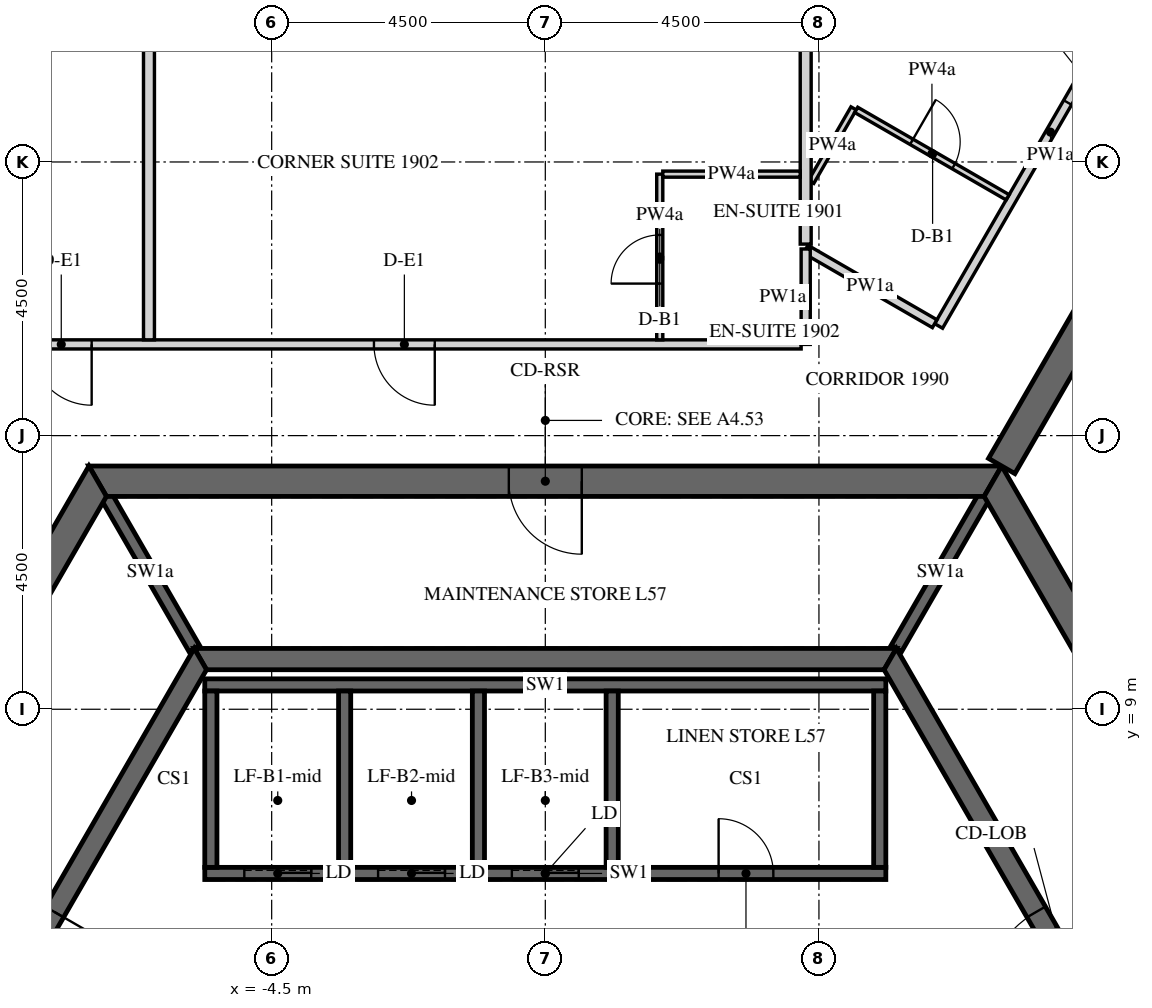
"""IFC4 building model, lengths in metres.
Left out: names, types, materials, properties, quantities, classifications, styles, units other than length and angle.
Written with IfcOpenShell. Run it as: python <this file> out.ifc"""

import sys

from ifc_helpers import new_model, si_unit, direction, frame, frame_2d, origin, place, context, subcontext, project, spatial, polyline, rectangle, outline, extrude, element, fill, save


model = new_model("IFC4")
c1 = context("Model", 3, precision=1e-05, world=origin(), true_north=direction((0.0, 1.0)))
c2 = subcontext(c1, "Body", "Model", "MODEL_VIEW")
j1 = project(units=[si_unit("LENGTHUNIT", "METRE"), si_unit("PLANEANGLEUNIT", "RADIAN")], contexts=[c1])
p1 = place(None, origin())
s1 = spatial("IfcSite", under=j1, at=p1, CompositionType="ELEMENT")
p2 = place(p1, origin())
s2 = spatial("IfcBuilding", under=s1, at=p2, CompositionType="ELEMENT")
p3 = place(p2, frame((0.0, 0.0, 238.5)))
s3 = spatial("IfcBuildingStorey", under=s2, at=p3, CompositionType="ELEMENT", Elevation=238.5)
p4 = place(p3, frame((-7.361, 12.75, -0.15), z_axis=(0.0, 0.0, 1.0), x_axis=(-0.50000571537, -0.866022103989, 0.0)))
e1 = element("IfcWall", 1, at=p4, inside=s3, PredefinedType="SHEAR", context=c2, shape_type="SweptSolid", body=[
    extrude(outline(polyline([(-0.144, -0.25), (14.867, -0.25), (14.578, 0.25), (0.144, 0.25), (-0.144, -0.25)])), origin(), (0.0, 0.0, 1.0), 3.9),
])
p5 = place(p4, frame((6.49, 0.0, 0.15)))
e2 = element("IfcOpeningElement", 2, at=p5, cuts=e1, PredefinedType="OPENING", context=c2, shape_type="SweptSolid", body=[
    extrude(rectangle(XDim=1.8, YDim=2.4, at=frame_2d((0.9, 1.2))), frame((0.0, 0.26, 0.0), z_axis=(0.0, -1.0, 0.0), x_axis=(1.0, 0.0, 0.0)), (0.0, 0.0, 1.0), 0.52),
])
p6 = place(p3, frame((14.722, 0.0, -0.15), z_axis=(0.0, 0.0, 1.0), x_axis=(-0.50000571537, 0.866022103989, 0.0)))
e3 = element("IfcWall", 3, at=p6, inside=s3, PredefinedType="SHEAR", context=c2, shape_type="SweptSolid", body=[
    extrude(outline(polyline([(-0.144, -0.25), (14.867, -0.25), (14.578, 0.25), (0.144, 0.25), (-0.144, -0.25)])), origin(), (0.0, 0.0, 1.0), 3.9),
])
p7 = place(p6, frame((6.432, 0.0, 0.15)))
e4 = element("IfcOpeningElement", 4, at=p7, cuts=e3, PredefinedType="OPENING", context=c2, shape_type="SweptSolid", body=[
    extrude(rectangle(XDim=1.8, YDim=2.4, at=frame_2d((0.9, 1.2))), frame((0.0, 0.26, 0.0), z_axis=(0.0, -1.0, 0.0), x_axis=(1.0, 0.0, 0.0)), (0.0, 0.0, 1.0), 0.52),
])
p8 = place(p3, frame((7.361, 12.75, -0.15), z_axis=(0.0, 0.0, 1.0), x_axis=(-1.0, 0.0, 0.0)))
e5 = element("IfcWall", 5, at=p8, inside=s3, PredefinedType="SHEAR", context=c2, shape_type="SweptSolid", body=[
    extrude(outline(polyline([(-0.144, -0.25), (14.866, -0.25), (14.578, 0.25), (0.144, 0.25), (-0.144, -0.25)])), origin(), (0.0, 0.0, 1.0), 3.9),
])
p9 = place(p8, frame((6.761, 0.0, 0.15)))
e6 = element("IfcOpeningElement", 6, at=p9, cuts=e5, PredefinedType="OPENING", context=c2, shape_type="SweptSolid", body=[
    extrude(rectangle(XDim=1.2, YDim=2.4, at=frame_2d((0.6, 1.2))), frame((0.0, 0.26, 0.0), z_axis=(0.0, -1.0, 0.0), x_axis=(1.0, 0.0, 0.0)), (0.0, 0.0, 1.0), 0.52),
])
p10 = place(p3, frame((7.506, 13.0, -0.15), z_axis=(0.0, 0.0, 1.0), x_axis=(0.499988271576, 0.866032175087, 0.0)))
e7 = element("IfcWall", 7, at=p10, inside=s3, PredefinedType="SHEAR", context=c2, shape_type="SweptSolid", body=[
    extrude(rectangle(XDim=15.424, YDim=0.5, at=frame_2d((7.712, 0.0))), origin(), (0.0, 0.0, 1.0), 3.9),
])
p11 = place(p10, frame((6.812, 0.0, 0.15)))
e8 = element("IfcOpeningElement", 8, at=p11, cuts=e7, PredefinedType="OPENING", context=c2, shape_type="SweptSolid", body=[
    extrude(rectangle(XDim=1.8, YDim=2.4, at=frame_2d((0.9, 1.2))), frame((0.0, 0.26, 0.0), z_axis=(0.0, -1.0, 0.0), x_axis=(1.0, 0.0, 0.0)), (0.0, 0.0, 1.0), 0.52),
])
p12 = place(p3, frame((-5.673, 9.825, -0.15), z_axis=(0.0, 0.0, 1.0), x_axis=(-0.499995046907, -0.866028263435, 0.0)))
e9 = element("IfcWall", 9, at=p12, inside=s3, PredefinedType="SHEAR", context=c2, shape_type="SweptSolid", body=[
    extrude(outline(polyline([(-0.101, -0.175), (11.446, -0.175), (11.244, 0.175), (0.101, 0.175), (-0.101, -0.175)])), origin(), (0.0, 0.0, 1.0), 3.9),
])
p13 = place(p12, frame((4.801, 0.0, 0.15)))
e10 = element("IfcOpeningElement", 10, at=p13, cuts=e9, PredefinedType="OPENING", context=c2, shape_type="SweptSolid", body=[
    extrude(rectangle(XDim=1.8, YDim=2.4, at=frame_2d((0.9, 1.2))), frame((0.0, 0.185, 0.0), z_axis=(0.0, -1.0, 0.0), x_axis=(1.0, 0.0, 0.0)), (0.0, 0.0, 1.0), 0.37),
])
p14 = place(p3, frame((11.345, 0.0, -0.15), z_axis=(0.0, 0.0, 1.0), x_axis=(-0.499995046907, 0.866028263435, 0.0)))
e11 = element("IfcWall", 11, at=p14, inside=s3, PredefinedType="SHEAR", context=c2, shape_type="SweptSolid", body=[
    extrude(outline(polyline([(-0.101, -0.175), (11.446, -0.175), (11.244, 0.175), (0.101, 0.175), (-0.101, -0.175)])), origin(), (0.0, 0.0, 1.0), 3.9),
])
p15 = place(p14, frame((4.744, 0.0, 0.15)))
e12 = element("IfcOpeningElement", 12, at=p15, cuts=e11, PredefinedType="OPENING", context=c2, shape_type="SweptSolid", body=[
    extrude(rectangle(XDim=1.8, YDim=2.4, at=frame_2d((0.9, 1.2))), frame((0.0, 0.185, 0.0), z_axis=(0.0, -1.0, 0.0), x_axis=(1.0, 0.0, 0.0)), (0.0, 0.0, 1.0), 0.37),
])
p16 = place(p3, frame((5.673, 9.825, -0.15), z_axis=(0.0, 0.0, 1.0), x_axis=(-1.0, 0.0, 0.0)))
e13 = element("IfcWall", 13, at=p16, inside=s3, PredefinedType="SHEAR", context=c2, shape_type="SweptSolid", body=[
    extrude(outline(polyline([(-0.101, -0.175), (11.446, -0.175), (11.244, 0.175), (0.101, 0.175), (-0.101, -0.175)])), origin(), (0.0, 0.0, 1.0), 3.9),
])
p17 = place(p3, frame((-5.6, 6.3, -0.25), z_axis=(0.0, 0.0, 1.0), x_axis=(1.0, 0.0, 0.0)))
e14 = element("IfcWall", 14, at=p17, inside=s3, PredefinedType="SHEAR", context=c2, shape_type="SweptSolid", body=[
    extrude(rectangle(XDim=11.2, YDim=0.2, at=frame_2d((5.6, 0.0))), origin(), (0.0, 0.0, 1.0), 3.9),
])
p18 = place(p17, frame((8.45, 0.0, 0.25)))
e15 = element("IfcOpeningElement", 15, at=p18, cuts=e14, PredefinedType="OPENING", context=c2, shape_type="SweptSolid", body=[
    extrude(rectangle(XDim=0.9, YDim=2.1, at=frame_2d((0.45, 1.05))), frame((0.0, 0.11, 0.0), z_axis=(0.0, -1.0, 0.0), x_axis=(1.0, 0.0, 0.0)), (0.0, 0.0, 1.0), 0.22),
])
p19 = place(p17, frame((0.65, 0.0, 0.25)))
e16 = element("IfcOpeningElement", 16, at=p19, cuts=e14, PredefinedType="OPENING", context=c2, shape_type="SweptSolid", body=[
    extrude(rectangle(XDim=1.1, YDim=2.1, at=frame_2d((0.55, 1.05))), frame((0.0, 0.11, 0.0), z_axis=(0.0, -1.0, 0.0), x_axis=(1.0, 0.0, 0.0)), (0.0, 0.0, 1.0), 0.22),
])
p20 = place(p17, frame((2.85, 0.0, 0.25)))
e17 = element("IfcOpeningElement", 17, at=p20, cuts=e14, PredefinedType="OPENING", context=c2, shape_type="SweptSolid", body=[
    extrude(rectangle(XDim=1.1, YDim=2.1, at=frame_2d((0.55, 1.05))), frame((0.0, 0.11, 0.0), z_axis=(0.0, -1.0, 0.0), x_axis=(1.0, 0.0, 0.0)), (0.0, 0.0, 1.0), 0.22),
])
p21 = place(p17, frame((5.05, 0.0, 0.25)))
e18 = element("IfcOpeningElement", 18, at=p21, cuts=e14, PredefinedType="OPENING", context=c2, shape_type="SweptSolid", body=[
    extrude(rectangle(XDim=1.1, YDim=2.1, at=frame_2d((0.55, 1.05))), frame((0.0, 0.11, 0.0), z_axis=(0.0, -1.0, 0.0), x_axis=(1.0, 0.0, 0.0)), (0.0, 0.0, 1.0), 0.22),
])
p22 = place(p3, frame((-5.6, 9.4, -0.25), z_axis=(0.0, 0.0, 1.0), x_axis=(1.0, 0.0, 0.0)))
e19 = element("IfcWall", 19, at=p22, inside=s3, PredefinedType="SHEAR", context=c2, shape_type="SweptSolid", body=[
    extrude(rectangle(XDim=11.2, YDim=0.2, at=frame_2d((5.6, 0.0))), origin(), (0.0, 0.0, 1.0), 3.9),
])
for number, where, z_axis, x_axis in (
    (20, (-5.5, 6.4, -0.25), (0.0, 0.0, 1.0), (0.0, 1.0, 0.0)),
    (21, (-3.3, 6.4, -0.25), (0.0, 0.0, 1.0), (0.0, 1.0, 0.0)),
    (22, (-1.1, 6.4, -0.25), (0.0, 0.0, 1.0), (0.0, 1.0, 0.0)),
    (23, (1.1, 6.4, -0.25), (0.0, 0.0, 1.0), (0.0, 1.0, 0.0)),
    (24, (5.5, 6.4, -0.25), (0.0, 0.0, 1.0), (0.0, 1.0, 0.0)),
):
    element("IfcWall", number, at=place(p3, frame(where, z_axis=z_axis, x_axis=x_axis)), inside=s3, PredefinedType="SHEAR", context=c2, shape_type="SweptSolid", body=[
        extrude(rectangle(XDim=2.9, YDim=0.2, at=frame_2d((1.45, 0.0))), origin(), (0.0, 0.0, 1.0), 3.9),
    ])
for number, where, z_axis, x_axis in (
    (25, (5.773, 10.0, -0.15), (0.0, 0.0, 1.0), (0.5, 0.866, 0.0)),
    (26, (-5.773, 10.0, -0.15), (0.0, 0.0, 1.0), (-0.5, 0.866, 0.0)),
):
    element("IfcWall", number, at=place(p3, frame(where, z_axis=z_axis, x_axis=x_axis)), inside=s3, PredefinedType="SHEAR", context=c2, shape_type="SweptSolid", body=[
        extrude(rectangle(XDim=2.887, YDim=0.2, at=frame_2d((1.443, 0.0))), origin(), (0.0, 0.0, 1.0), 3.9),
    ])
p23 = place(p3, frame((10.149, 21.678, 0.0), z_axis=(0.0, 0.0, 1.0), x_axis=(-0.500020076982, -0.866013812023, 0.0)))
e27 = element("IfcWall", 27, at=p23, inside=s3, PredefinedType="PARTITIONING", context=c2, shape_type="SweptSolid", body=[
    extrude(rectangle(XDim=7.361, YDim=0.15, at=frame_2d((3.681, 0.0))), origin(), (0.0, 0.0, 1.0), 2.838),
])
p24 = place(p23, frame((2.118, 0.0, 0.0)))
e28 = element("IfcOpeningElement", 28, at=p24, cuts=e27, PredefinedType="OPENING", context=c2, shape_type="SweptSolid", body=[
    extrude(rectangle(XDim=1.0, YDim=2.1, at=frame_2d((0.5, 1.05))), frame((0.0, 0.085, 0.0), z_axis=(0.0, -1.0, 0.0), x_axis=(1.0, 0.0, 0.0)), (0.0, 0.0, 1.0), 0.17),
])
p25 = place(p3, frame((6.403, 15.341, 0.0), z_axis=(0.0, 0.0, 1.0), x_axis=(-0.8660013066, 0.500041735226, 0.0)))
e29 = element("IfcWall", 29, at=p25, inside=s3, PredefinedType="PARTITIONING", context=c2, shape_type="SweptSolid", body=[
    extrude(rectangle(XDim=2.449, YDim=0.15, at=frame_2d((1.225, 0.0))), origin(), (0.0, 0.0, 1.0), 2.838),
])
p26 = place(p3, frame((4.207, 15.0, 0.0), z_axis=(0.0, 0.0, 1.0), x_axis=(-1.0, 0.0, 0.0)))
e30 = element("IfcWall", 30, at=p26, inside=s3, PredefinedType="PARTITIONING", context=c2, shape_type="SweptSolid", body=[
    extrude(rectangle(XDim=12.867, YDim=0.15, at=frame_2d((6.434, 0.0))), origin(), (0.0, 0.0, 1.0), 2.838),
])
p27 = place(p26, frame((6.025, 0.0, 0.0)))
e31 = element("IfcOpeningElement", 31, at=p27, cuts=e30, PredefinedType="OPENING", context=c2, shape_type="SweptSolid", body=[
    extrude(rectangle(XDim=1.0, YDim=2.1, at=frame_2d((0.5, 1.05))), frame((0.0, 0.085, 0.0), z_axis=(0.0, -1.0, 0.0), x_axis=(1.0, 0.0, 0.0)), (0.0, 0.0, 1.0), 0.17),
])
p28 = place(p26, frame((11.667, 0.0, 0.0)))
e32 = element("IfcOpeningElement", 32, at=p28, cuts=e30, PredefinedType="OPENING", context=c2, shape_type="SweptSolid", body=[
    extrude(rectangle(XDim=1.0, YDim=2.1, at=frame_2d((0.5, 1.05))), frame((0.0, 0.085, 0.0), z_axis=(0.0, -1.0, 0.0), x_axis=(1.0, 0.0, 0.0)), (0.0, 0.0, 1.0), 0.17),
])
p29 = place(p3, frame((4.282, 16.569, 0.0), z_axis=(0.0, 0.0, 1.0), x_axis=(0.0, -1.0, 0.0)))
e33 = element("IfcWall", 33, at=p29, inside=s3, PredefinedType="PARTITIONING", context=c2, shape_type="SweptSolid", body=[
    extrude(rectangle(XDim=1.569, YDim=0.15, at=frame_2d((0.785, 0.0))), origin(), (0.0, 0.0, 1.0), 2.838),
])
p30 = place(p3, frame((4.372, 17.673, 0.0), z_axis=(0.0, 0.0, 1.0), x_axis=(0.50007068215, 0.86598459158, 0.0)))
e34 = element("IfcWall", 34, at=p30, inside=s3, PredefinedType="PARTITIONING", context=c2, shape_type="SweptSolid", body=[
    extrude(rectangle(XDim=1.396, YDim=0.1, at=frame_2d((0.698, 0.0))), origin(), (0.0, 0.0, 1.0), 2.838),
])
p31 = place(p3, frame((5.113, 18.857, 0.0), z_axis=(0.0, 0.0, 1.0), x_axis=(0.866039941686, -0.499974818771, 0.0)))
e35 = element("IfcWall", 35, at=p31, inside=s3, PredefinedType="PARTITIONING", context=c2, shape_type="SweptSolid", body=[
    extrude(rectangle(XDim=2.875, YDim=0.1, at=frame_2d((1.438, 0.0))), origin(), (0.0, 0.0, 1.0), 2.838),
])
p32 = place(p31, frame((1.05, 0.0, 0.0)))
e36 = element("IfcOpeningElement", 36, at=p32, cuts=e35, PredefinedType="OPENING", context=c2, shape_type="SweptSolid", body=[
    extrude(rectangle(XDim=0.8, YDim=2.1, at=frame_2d((0.4, 1.05))), frame((0.0, 0.06, 0.0), z_axis=(0.0, -1.0, 0.0), x_axis=(1.0, 0.0, 0.0)), (0.0, 0.0, 1.0), 0.12),
])
p33 = place(p3, frame((4.282, 27.45, 0.0), z_axis=(0.0, 0.0, 1.0), x_axis=(0.0, -1.0, 0.0)))
e37 = element("IfcWall", 37, at=p33, inside=s3, PredefinedType="PARTITIONING", context=c2, shape_type="SweptSolid", body=[
    extrude(rectangle(XDim=10.801, YDim=0.18, at=frame_2d((5.4, 0.0))), origin(), (0.0, 0.0, 1.0), 2.838),
])
p34 = place(p3, frame((1.882, 15.075, 0.0), z_axis=(0.0, 0.0, 1.0), x_axis=(0.0, 1.0, 0.0)))
e38 = element("IfcWall", 38, at=p34, inside=s3, PredefinedType="PARTITIONING", context=c2, shape_type="SweptSolid", body=[
    extrude(rectangle(XDim=2.725, YDim=0.1, at=frame_2d((1.363, 0.0))), origin(), (0.0, 0.0, 1.0), 2.838),
])
p35 = place(p34, frame((0.925, 0.0, 0.0)))
e39 = element("IfcOpeningElement", 39, at=p35, cuts=e38, PredefinedType="OPENING", context=c2, shape_type="SweptSolid", body=[
    extrude(rectangle(XDim=0.8, YDim=2.1, at=frame_2d((0.4, 1.05))), frame((0.0, 0.06, 0.0), z_axis=(0.0, -1.0, 0.0), x_axis=(1.0, 0.0, 0.0)), (0.0, 0.0, 1.0), 0.12),
])
p36 = place(p3, frame((1.932, 17.8, 0.0), z_axis=(0.0, 0.0, 1.0), x_axis=(1.0, 0.0, 0.0)))
e40 = element("IfcWall", 40, at=p36, inside=s3, PredefinedType="PARTITIONING", context=c2, shape_type="SweptSolid", body=[
    extrude(rectangle(XDim=2.26, YDim=0.1, at=frame_2d((1.13, 0.0))), origin(), (0.0, 0.0, 1.0), 2.838),
])
p37 = place(p3, frame((-6.518, 27.45, 0.0), z_axis=(0.0, 0.0, 1.0), x_axis=(0.0, -1.0, 0.0)))
e41 = element("IfcWall", 41, at=p37, inside=s3, PredefinedType="PARTITIONING", context=c2, shape_type="SweptSolid", body=[
    extrude(rectangle(XDim=12.375, YDim=0.18, at=frame_2d((6.188, 0.0))), origin(), (0.0, 0.0, 1.0), 2.838),
])
p38 = place(p9, origin())
e42 = element("IfcDoor", 42, at=p38, inside=s3, OperationType="SINGLE_SWING_LEFT", PredefinedType="DOOR", context=c2, shape_type="SweptSolid", body=[
    extrude(rectangle(XDim=1.2, YDim=2.4, at=frame_2d((0.6, 1.2))), frame((0.0, 0.025, 0.0), z_axis=(0.0, -1.0, 0.0), x_axis=(1.0, 0.0, 0.0)), (0.0, 0.0, 1.0), 0.05),
])
fill(e6, e42)
p39 = place(p13, origin())
e43 = element("IfcDoor", 43, at=p39, inside=s3, OperationType="DOUBLE_DOOR_SINGLE_SWING", PredefinedType="DOOR", context=c2, shape_type="SweptSolid", body=[
    extrude(rectangle(XDim=1.8, YDim=2.4, at=frame_2d((0.9, 1.2))), frame((0.0, 0.025, 0.0), z_axis=(0.0, -1.0, 0.0), x_axis=(1.0, 0.0, 0.0)), (0.0, 0.0, 1.0), 0.05),
])
fill(e10, e43)
p40 = place(p15, origin())
e44 = element("IfcDoor", 44, at=p40, inside=s3, OperationType="DOUBLE_DOOR_SINGLE_SWING", PredefinedType="DOOR", context=c2, shape_type="SweptSolid", body=[
    extrude(rectangle(XDim=1.8, YDim=2.4, at=frame_2d((0.9, 1.2))), frame((0.0, 0.025, 0.0), z_axis=(0.0, -1.0, 0.0), x_axis=(1.0, 0.0, 0.0)), (0.0, 0.0, 1.0), 0.05),
])
fill(e12, e44)
p41 = place(p18, origin())
e45 = element("IfcDoor", 45, at=p41, inside=s3, OperationType="SINGLE_SWING_LEFT", PredefinedType="DOOR", context=c2, shape_type="SweptSolid", body=[
    extrude(rectangle(XDim=0.9, YDim=2.1, at=frame_2d((0.45, 1.05))), frame((0.0, 0.025, 0.0), z_axis=(0.0, -1.0, 0.0), x_axis=(1.0, 0.0, 0.0)), (0.0, 0.0, 1.0), 0.05),
])
fill(e15, e45)
p42 = place(p19, origin())
e46 = element("IfcDoor", 46, at=p42, inside=s3, OperationType="SLIDING_TO_LEFT", PredefinedType="DOOR", context=c2, shape_type="SweptSolid", body=[
    extrude(rectangle(XDim=1.1, YDim=2.1, at=frame_2d((0.55, 1.05))), frame((0.0, 0.025, 0.0), z_axis=(0.0, -1.0, 0.0), x_axis=(1.0, 0.0, 0.0)), (0.0, 0.0, 1.0), 0.05),
])
fill(e16, e46)
p43 = place(p20, origin())
e47 = element("IfcDoor", 47, at=p43, inside=s3, OperationType="SLIDING_TO_LEFT", PredefinedType="DOOR", context=c2, shape_type="SweptSolid", body=[
    extrude(rectangle(XDim=1.1, YDim=2.1, at=frame_2d((0.55, 1.05))), frame((0.0, 0.025, 0.0), z_axis=(0.0, -1.0, 0.0), x_axis=(1.0, 0.0, 0.0)), (0.0, 0.0, 1.0), 0.05),
])
fill(e17, e47)
p44 = place(p21, origin())
e48 = element("IfcDoor", 48, at=p44, inside=s3, OperationType="SLIDING_TO_LEFT", PredefinedType="DOOR", context=c2, shape_type="SweptSolid", body=[
    extrude(rectangle(XDim=1.1, YDim=2.1, at=frame_2d((0.55, 1.05))), frame((0.0, 0.025, 0.0), z_axis=(0.0, -1.0, 0.0), x_axis=(1.0, 0.0, 0.0)), (0.0, 0.0, 1.0), 0.05),
])
fill(e18, e48)
p45 = place(p24, origin())
e49 = element("IfcDoor", 49, at=p45, inside=s3, OperationType="SINGLE_SWING_LEFT", PredefinedType="DOOR", context=c2, shape_type="SweptSolid", body=[
    extrude(rectangle(XDim=1.0, YDim=2.1, at=frame_2d((0.5, 1.05))), frame((0.0, 0.025, 0.0), z_axis=(0.0, -1.0, 0.0), x_axis=(1.0, 0.0, 0.0)), (0.0, 0.0, 1.0), 0.05),
])
fill(e28, e49)
p46 = place(p32, origin())
e50 = element("IfcDoor", 50, at=p46, inside=s3, OperationType="SINGLE_SWING_RIGHT", PredefinedType="DOOR", context=c2, shape_type="SweptSolid", body=[
    extrude(rectangle(XDim=0.8, YDim=2.1, at=frame_2d((0.4, 1.05))), frame((0.0, 0.025, 0.0), z_axis=(0.0, -1.0, 0.0), x_axis=(1.0, 0.0, 0.0)), (0.0, 0.0, 1.0), 0.05),
])
fill(e36, e50)
p47 = place(p27, origin())
e51 = element("IfcDoor", 51, at=p47, inside=s3, OperationType="SINGLE_SWING_RIGHT", PredefinedType="DOOR", context=c2, shape_type="SweptSolid", body=[
    extrude(rectangle(XDim=1.0, YDim=2.1, at=frame_2d((0.5, 1.05))), frame((0.0, 0.025, 0.0), z_axis=(0.0, -1.0, 0.0), x_axis=(1.0, 0.0, 0.0)), (0.0, 0.0, 1.0), 0.05),
])
fill(e31, e51)
p48 = place(p35, origin())
e52 = element("IfcDoor", 52, at=p48, inside=s3, OperationType="SINGLE_SWING_RIGHT", PredefinedType="DOOR", context=c2, shape_type="SweptSolid", body=[
    extrude(rectangle(XDim=0.8, YDim=2.1, at=frame_2d((0.4, 1.05))), frame((0.0, 0.025, 0.0), z_axis=(0.0, -1.0, 0.0), x_axis=(1.0, 0.0, 0.0)), (0.0, 0.0, 1.0), 0.05),
])
fill(e39, e52)
p49 = place(p28, origin())
e53 = element("IfcDoor", 53, at=p49, inside=s3, OperationType="SINGLE_SWING_LEFT", PredefinedType="DOOR", context=c2, shape_type="SweptSolid", body=[
    extrude(rectangle(XDim=1.0, YDim=2.1, at=frame_2d((0.5, 1.05))), frame((0.0, 0.025, 0.0), z_axis=(0.0, -1.0, 0.0), x_axis=(1.0, 0.0, 0.0)), (0.0, 0.0, 1.0), 0.05),
])
fill(e32, e53)
save(model, sys.argv[1])
